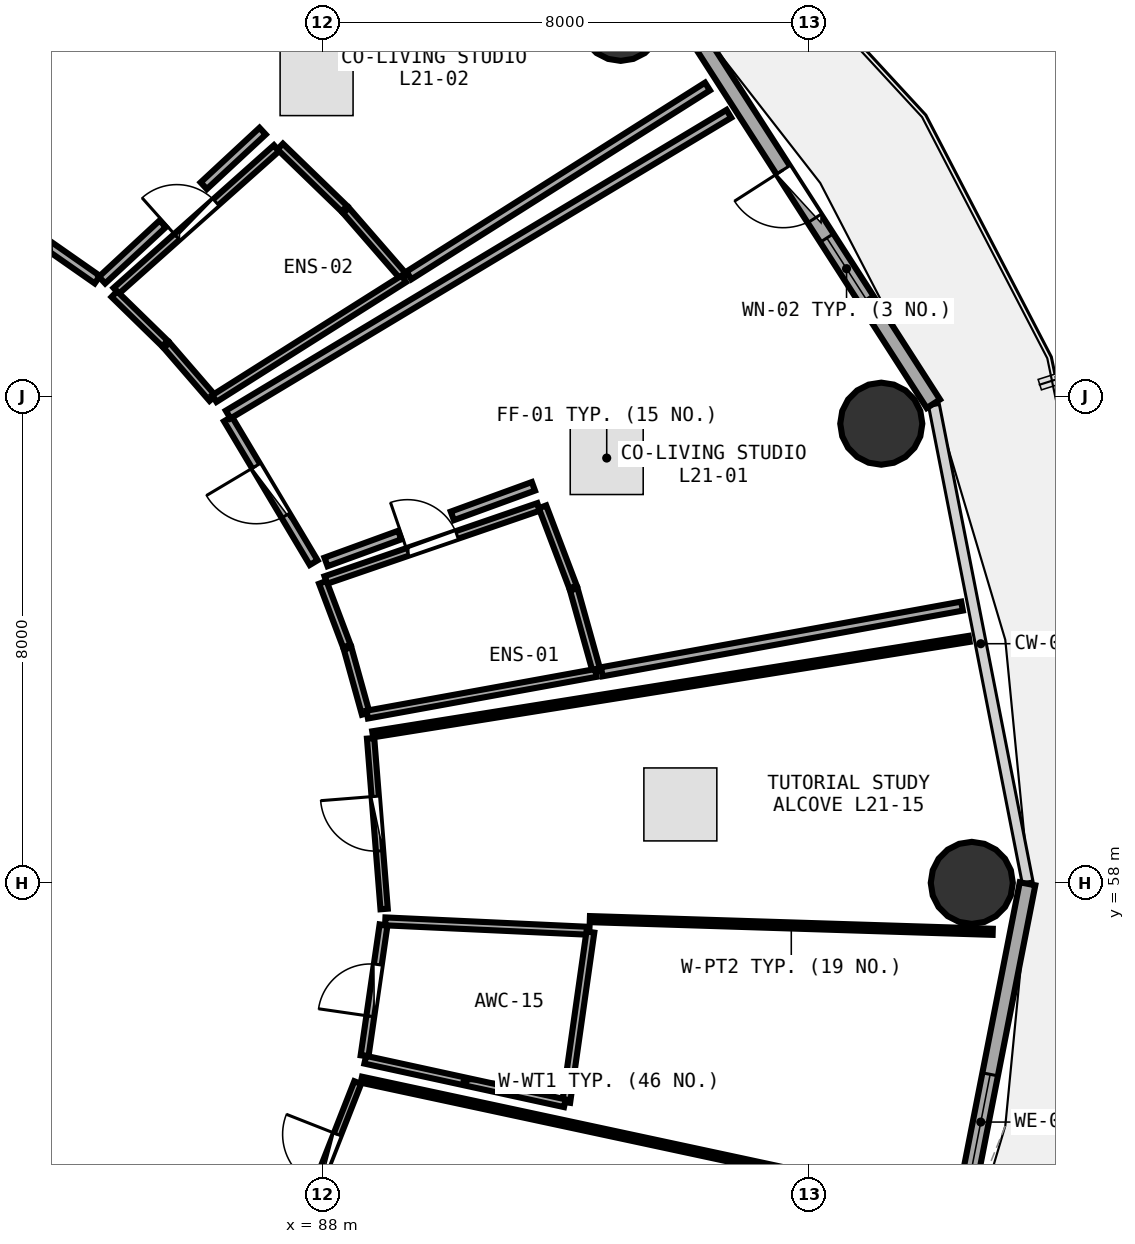
"""IFC4 building model, lengths in metres.
Left out: names, types, materials, properties, quantities, classifications, styles, units other than length and angle.
Written with IfcOpenShell. Run it as: python <this file> out.ifc"""

import sys

from ifc_helpers import new_model, si_unit, direction, frame, frame_2d, origin, origin_2d, place, context, subcontext, project, spatial, rectangle, circle, extrude, element, fill, save


model = new_model("IFC4")
c1 = context("Model", 3, precision=1e-05, world=origin(), true_north=direction((0.0, 1.0)))
c2 = subcontext(c1, "Body", "Model", "MODEL_VIEW")
j1 = project(units=[si_unit("LENGTHUNIT", "METRE"), si_unit("PLANEANGLEUNIT", "RADIAN")], contexts=[c1])
p1 = place(None, origin())
s1 = spatial("IfcSite", under=j1, at=p1, CompositionType="ELEMENT")
p2 = place(p1, origin())
s2 = spatial("IfcBuilding", under=s1, at=p2, CompositionType="ELEMENT")
p3 = place(p2, frame((0.0, 0.0, 83.85)))
s3 = spatial("IfcBuildingStorey", under=s2, at=p3, CompositionType="ELEMENT", Elevation=83.85)
for number, where, z_axis, x_axis in (
    (1, (98.68, 58.0, 0.0), (0.0, 0.0, 1.0), (1.0, 0.0, 0.0)),
    (2, (97.192, 65.552, 0.0), (0.0, 0.0, 1.0), (1.0, 0.0, 0.0)),
    (3, (92.906, 72.193, 0.0), (0.0, 0.0, 1.0), (1.0, 0.0, 0.0)),
):
    element("IfcColumn", number, at=place(p3, frame(where, z_axis=z_axis, x_axis=x_axis)), inside=s3, PredefinedType="COLUMN", context=c2, shape_type="SweptSolid", body=[
        extrude(circle(Radius=0.675, at=origin_2d()), origin(), (0.0, 0.0, 1.0), 3.75),
    ])
p4 = place(p3, frame((98.048, 65.879, 0.0), z_axis=(0.0, 0.0, 1.0), x_axis=(-0.540620528459, 0.841266571432, 0.0)))
e4 = element("IfcWall", 4, at=p4, inside=s3, PredefinedType="SOLIDWALL", context=c2, shape_type="SweptSolid", body=[
    extrude(rectangle(XDim=8.193, YDim=0.26, at=frame_2d((4.096, 0.0))), origin(), (0.0, 0.0, 1.0), 3.475),
])
p5 = place(p4, frame((3.621, 0.0, 0.0)))
e5 = element("IfcOpeningElement", 5, at=p5, cuts=e4, PredefinedType="OPENING", context=c2, shape_type="SweptSolid", body=[
    extrude(rectangle(XDim=0.95, YDim=2.1, at=frame_2d((0.475, 1.05))), frame((0.0, 0.14, 0.0), z_axis=(0.0, -1.0, 0.0), x_axis=(1.0, 0.0, 0.0)), (0.0, 0.0, 1.0), 0.28),
])
p6 = place(p4, frame((2.041, 0.0, 0.85)))
e6 = element("IfcOpeningElement", 6, at=p6, cuts=e4, PredefinedType="OPENING", context=c2, shape_type="SweptSolid", body=[
    extrude(rectangle(XDim=1.2, YDim=1.45, at=frame_2d((0.6, 0.725))), frame((0.0, 0.14, 0.0), z_axis=(0.0, -1.0, 0.0), x_axis=(1.0, 0.0, 0.0)), (0.0, 0.0, 1.0), 0.28),
])
p7 = place(p3, frame((98.059, 50.148, 0.0), z_axis=(0.0, 0.0, 1.0), x_axis=(0.192581843632, 0.981280914674, 0.0)))
e7 = element("IfcWall", 7, at=p7, inside=s3, PredefinedType="SOLIDWALL", context=c2, shape_type="SweptSolid", body=[
    extrude(rectangle(XDim=7.987, YDim=0.26, at=frame_2d((3.993, 0.0))), origin(), (0.0, 0.0, 1.0), 3.475),
])
p8 = place(p7, frame((3.193, 0.0, 0.85)))
e8 = element("IfcOpeningElement", 8, at=p8, cuts=e7, PredefinedType="OPENING", context=c2, shape_type="SweptSolid", body=[
    extrude(rectangle(XDim=1.6, YDim=1.45, at=frame_2d((0.8, 0.725))), frame((0.0, 0.14, 0.0), z_axis=(0.0, -1.0, 0.0), x_axis=(1.0, 0.0, 0.0)), (0.0, 0.0, 1.0), 0.28),
])
p9 = place(p3, frame((88.056, 62.98, 0.0), z_axis=(0.0, 0.0, 1.0), x_axis=(0.94570750663, 0.325018940838, 0.0)))
e9 = element("IfcWall", 9, at=p9, inside=s3, PredefinedType="PLUMBINGWALL", context=c2, shape_type="SweptSolid", body=[
    extrude(rectangle(XDim=3.702, YDim=0.13, at=frame_2d((1.851, 0.0))), origin(), (0.0, 0.0, 1.0), 3.175),
])
p10 = place(p9, frame((1.421, 0.0, 0.0)))
e10 = element("IfcOpeningElement", 10, at=p10, cuts=e9, PredefinedType="OPENING", context=c2, shape_type="SweptSolid", body=[
    extrude(rectangle(XDim=0.86, YDim=2.05, at=frame_2d((0.43, 1.025))), frame((0.0, 0.075, 0.0), z_axis=(0.0, -1.0, 0.0), x_axis=(1.0, 0.0, 0.0)), (0.0, 0.0, 1.0), 0.15),
])
p11 = place(p3, frame((87.856, 63.267, 0.0), z_axis=(0.0, 0.0, 1.0), x_axis=(-0.512288635556, 0.858813340535, 0.0)))
e11 = element("IfcWall", 11, at=p11, inside=s3, PredefinedType="PARTITIONING", context=c2, shape_type="SweptSolid", body=[
    extrude(rectangle(XDim=2.751, YDim=0.15, at=frame_2d((1.375, 0.0))), origin(), (0.0, 0.0, 1.0), 2.925),
])
p12 = place(p11, frame((0.901, 0.0, 0.0)))
e12 = element("IfcOpeningElement", 12, at=p12, cuts=e11, PredefinedType="OPENING", context=c2, shape_type="SweptSolid", body=[
    extrude(rectangle(XDim=0.95, YDim=2.08, at=frame_2d((0.475, 1.04))), frame((0.0, 0.085, 0.0), z_axis=(0.0, -1.0, 0.0), x_axis=(1.0, 0.0, 0.0)), (0.0, 0.0, 1.0), 0.17),
])
p13 = place(p3, frame((84.609, 67.736, 0.0), z_axis=(0.0, 0.0, 1.0), x_axis=(0.746989483068, 0.664835853565, 0.0)))
e13 = element("IfcWall", 13, at=p13, inside=s3, PredefinedType="PLUMBINGWALL", context=c2, shape_type="SweptSolid", body=[
    extrude(rectangle(XDim=3.531, YDim=0.13, at=frame_2d((1.765, 0.0))), origin(), (0.0, 0.0, 1.0), 3.175),
])
p14 = place(p13, frame((1.335, 0.0, 0.0)))
e14 = element("IfcOpeningElement", 14, at=p14, cuts=e13, PredefinedType="OPENING", context=c2, shape_type="SweptSolid", body=[
    extrude(rectangle(XDim=0.86, YDim=2.05, at=frame_2d((0.43, 1.025))), frame((0.0, 0.075, 0.0), z_axis=(0.0, -1.0, 0.0), x_axis=(1.0, 0.0, 0.0)), (0.0, 0.0, 1.0), 0.15),
])
p15 = place(p3, frame((84.298, 67.92, 0.0), z_axis=(0.0, 0.0, 1.0), x_axis=(-0.819775565256, 0.572684924378, 0.0)))
e15 = element("IfcWall", 15, at=p15, inside=s3, PredefinedType="PARTITIONING", context=c2, shape_type="SweptSolid", body=[
    extrude(rectangle(XDim=2.867, YDim=0.15, at=frame_2d((1.434, 0.0))), origin(), (0.0, 0.0, 1.0), 2.925),
])
p16 = place(p15, frame((0.959, 0.0, 0.0)))
e16 = element("IfcOpeningElement", 16, at=p16, cuts=e15, PredefinedType="OPENING", context=c2, shape_type="SweptSolid", body=[
    extrude(rectangle(XDim=0.95, YDim=2.08, at=frame_2d((0.475, 1.04))), frame((0.0, 0.085, 0.0), z_axis=(0.0, -1.0, 0.0), x_axis=(1.0, 0.0, 0.0)), (0.0, 0.0, 1.0), 0.17),
])
p17 = place(p3, frame((87.582, 52.177, 0.0), z_axis=(0.0, 0.0, 1.0), x_axis=(0.365846135531, 0.930675348936, 0.0)))
e17 = element("IfcWall", 17, at=p17, inside=s3, PredefinedType="PARTITIONING", context=c2, shape_type="SweptSolid", body=[
    extrude(rectangle(XDim=2.729, YDim=0.12, at=frame_2d((1.364, 0.0))), origin(), (0.0, 0.0, 1.0), 3.235),
])
p18 = place(p17, frame((0.914, 0.0, 0.0)))
e18 = element("IfcOpeningElement", 18, at=p18, cuts=e17, PredefinedType="OPENING", context=c2, shape_type="SweptSolid", body=[
    extrude(rectangle(XDim=0.9, YDim=2.08, at=frame_2d((0.45, 1.04))), frame((0.0, 0.07, 0.0), z_axis=(0.0, -1.0, 0.0), x_axis=(1.0, 0.0, 0.0)), (0.0, 0.0, 1.0), 0.14),
])
p19 = place(p3, frame((88.694, 55.156, 0.0), z_axis=(0.0, 0.0, 1.0), x_axis=(0.14330641518, 0.989678367637, 0.0)))
e19 = element("IfcWall", 19, at=p19, inside=s3, PredefinedType="PLUMBINGWALL", context=c2, shape_type="SweptSolid", body=[
    extrude(rectangle(XDim=2.176, YDim=0.13, at=frame_2d((1.088, 0.0))), origin(), (0.0, 0.0, 1.0), 3.48),
])
p20 = place(p19, frame((0.658, 0.0, 0.0)))
e20 = element("IfcOpeningElement", 20, at=p20, cuts=e19, PredefinedType="OPENING", context=c2, shape_type="SweptSolid", body=[
    extrude(rectangle(XDim=0.86, YDim=2.05, at=frame_2d((0.43, 1.025))), frame((0.0, 0.075, 0.0), z_axis=(0.0, -1.0, 0.0), x_axis=(1.0, 0.0, 0.0)), (0.0, 0.0, 1.0), 0.15),
])
p21 = place(p3, frame((89.015, 57.571, 0.0), z_axis=(0.0, 0.0, 1.0), x_axis=(-0.079090310477, 0.996867454975, 0.0)))
e21 = element("IfcWall", 21, at=p21, inside=s3, PredefinedType="PARTITIONING", context=c2, shape_type="SweptSolid", body=[
    extrude(rectangle(XDim=2.815, YDim=0.12, at=frame_2d((1.408, 0.0))), origin(), (0.0, 0.0, 1.0), 2.925),
])
p22 = place(p21, frame((0.958, 0.0, 0.0)))
e22 = element("IfcOpeningElement", 22, at=p22, cuts=e21, PredefinedType="OPENING", context=c2, shape_type="SweptSolid", body=[
    extrude(rectangle(XDim=0.9, YDim=2.08, at=frame_2d((0.45, 1.04))), frame((0.0, 0.07, 0.0), z_axis=(0.0, -1.0, 0.0), x_axis=(1.0, 0.0, 0.0)), (0.0, 0.0, 1.0), 0.14),
])
p23 = place(p3, frame((88.713, 60.783, 0.0), z_axis=(0.0, 0.0, 1.0), x_axis=(-0.267768177699, 0.963483369349, 0.0)))
e23 = element("IfcWall", 23, at=p23, inside=s3, PredefinedType="PLUMBINGWALL", context=c2, shape_type="SweptSolid", body=[
    extrude(rectangle(XDim=1.114, YDim=0.13, at=frame_2d((0.557, 0.0))), origin(), (0.0, 0.0, 1.0), 3.48),
])
p24 = place(p3, frame((88.402, 61.895, 0.0), z_axis=(0.0, 0.0, 1.0), x_axis=(-0.353392089541, 0.935475296868, 0.0)))
e24 = element("IfcWall", 24, at=p24, inside=s3, PredefinedType="PLUMBINGWALL", context=c2, shape_type="SweptSolid", body=[
    extrude(rectangle(XDim=1.12, YDim=0.13, at=frame_2d((0.56, 0.0))), origin(), (0.0, 0.0, 1.0), 3.235),
])
p25 = place(p3, frame((91.62, 64.184, 0.0), z_axis=(0.0, 0.0, 1.0), x_axis=(0.355383981736, -0.934720399652, 0.0)))
e25 = element("IfcWall", 25, at=p25, inside=s3, PredefinedType="PLUMBINGWALL", context=c2, shape_type="SweptSolid", body=[
    extrude(rectangle(XDim=1.412, YDim=0.13, at=frame_2d((0.706, 0.0))), origin(), (0.0, 0.0, 1.0), 3.48),
])
p26 = place(p3, frame((92.135, 62.827, 0.0), z_axis=(0.0, 0.0, 1.0), x_axis=(0.268855284743, -0.963180583206, 0.0)))
e26 = element("IfcWall", 26, at=p26, inside=s3, PredefinedType="PLUMBINGWALL", context=c2, shape_type="SweptSolid", body=[
    extrude(rectangle(XDim=1.403, YDim=0.13, at=frame_2d((0.702, 0.0))), origin(), (0.0, 0.0, 1.0), 3.48),
])
p27 = place(p3, frame((92.497, 61.452, 0.0), z_axis=(0.0, 0.0, 1.0), x_axis=(-0.983811592037, -0.17920589101, 0.0)))
e27 = element("IfcWall", 27, at=p27, inside=s3, PredefinedType="PLUMBINGWALL", context=c2, shape_type="SweptSolid", body=[
    extrude(rectangle(XDim=3.821, YDim=0.13, at=frame_2d((1.911, 0.0))), origin(), (0.0, 0.0, 1.0), 3.175),
])
p28 = place(p3, frame((86.45, 65.702, 0.0), z_axis=(0.0, 0.0, 1.0), x_axis=(0.857261851198, 0.514880683731, 0.0)))
e28 = element("IfcWall", 28, at=p28, inside=s3, PredefinedType="PARTITIONING", context=c2, shape_type="SweptSolid", body=[
    extrude(rectangle(XDim=9.606, YDim=0.15, at=frame_2d((4.803, 0.0))), origin(), (0.0, 0.0, 1.0), 2.975),
])
p29 = place(p3, frame((98.52, 62.552, 0.0), z_axis=(0.0, 0.0, 1.0), x_axis=(-0.983768558102, -0.17944197973, 0.0)))
e29 = element("IfcWall", 29, at=p29, inside=s3, PredefinedType="PARTITIONING", context=c2, shape_type="SweptSolid", body=[
    extrude(rectangle(XDim=6.022, YDim=0.15, at=frame_2d((3.011, 0.0))), origin(), (0.0, 0.0, 1.0), 2.975),
])
p30 = place(p3, frame((91.47, 64.521, 0.0), z_axis=(0.0, 0.0, 1.0), x_axis=(-0.939526959999, -0.342474950084, 0.0)))
e30 = element("IfcWall", 30, at=p30, inside=s3, PredefinedType="PARTITIONING", context=c2, shape_type="SweptSolid", body=[
    extrude(rectangle(XDim=1.419, YDim=0.15, at=frame_2d((0.71, 0.0))), origin(), (0.0, 0.0, 1.0), 3.175),
])
p31 = place(p3, frame((89.272, 63.72, 0.0), z_axis=(0.0, 0.0, 1.0), x_axis=(-0.939522570491, -0.342486991779, 0.0)))
e31 = element("IfcWall", 31, at=p31, inside=s3, PredefinedType="PARTITIONING", context=c2, shape_type="SweptSolid", body=[
    extrude(rectangle(XDim=1.291, YDim=0.15, at=frame_2d((0.646, 0.0))), origin(), (0.0, 0.0, 1.0), 3.235),
])
p32 = place(p3, frame((86.193, 65.969, 0.0), z_axis=(0.0, 0.0, 1.0), x_axis=(-0.654583900851, 0.755989362853, 0.0)))
e32 = element("IfcWall", 32, at=p32, inside=s3, PredefinedType="PLUMBINGWALL", context=c2, shape_type="SweptSolid", body=[
    extrude(rectangle(XDim=1.153, YDim=0.13, at=frame_2d((0.577, 0.0))), origin(), (0.0, 0.0, 1.0), 3.48),
])
p33 = place(p3, frame((85.411, 66.87, 0.0), z_axis=(0.0, 0.0, 1.0), x_axis=(-0.715871547002, 0.698232001696, 0.0)))
e33 = element("IfcWall", 33, at=p33, inside=s3, PredefinedType="PLUMBINGWALL", context=c2, shape_type="SweptSolid", body=[
    extrude(rectangle(XDim=1.163, YDim=0.13, at=frame_2d((0.581, 0.0))), origin(), (0.0, 0.0, 1.0), 2.925),
])
p34 = place(p3, frame((87.305, 70.109, 0.0), z_axis=(0.0, 0.0, 1.0), x_axis=(0.718235032224, -0.69580057379, 0.0)))
e34 = element("IfcWall", 34, at=p34, inside=s3, PredefinedType="PLUMBINGWALL", context=c2, shape_type="SweptSolid", body=[
    extrude(rectangle(XDim=1.469, YDim=0.13, at=frame_2d((0.735, 0.0))), origin(), (0.0, 0.0, 1.0), 2.925),
])
p35 = place(p3, frame((88.388, 69.058, 0.0), z_axis=(0.0, 0.0, 1.0), x_axis=(0.656315808405, -0.754486288568, 0.0)))
e35 = element("IfcWall", 35, at=p35, inside=s3, PredefinedType="PLUMBINGWALL", context=c2, shape_type="SweptSolid", body=[
    extrude(rectangle(XDim=1.455, YDim=0.13, at=frame_2d((0.728, 0.0))), origin(), (0.0, 0.0, 1.0), 2.925),
])
p36 = place(p3, frame((89.339, 67.934, 0.0), z_axis=(0.0, 0.0, 1.0), x_axis=(-0.845293712827, -0.53430191751, 0.0)))
e36 = element("IfcWall", 36, at=p36, inside=s3, PredefinedType="PLUMBINGWALL", context=c2, shape_type="SweptSolid", body=[
    extrude(rectangle(XDim=3.687, YDim=0.13, at=frame_2d((1.843, 0.0))), origin(), (0.0, 0.0, 1.0), 3.175),
])
p37 = place(p3, frame((81.921, 69.63, 0.0), z_axis=(0.0, 0.0, 1.0), x_axis=(0.574246298275, 0.818682593511, 0.0)))
e37 = element("IfcWall", 37, at=p37, inside=s3, PredefinedType="PARTITIONING", context=c2, shape_type="SweptSolid", body=[
    extrude(rectangle(XDim=8.525, YDim=0.15, at=frame_2d((4.262, 0.0))), origin(), (0.0, 0.0, 1.0), 2.925),
])
p38 = place(p3, frame((94.333, 71.097, 0.0), z_axis=(0.0, 0.0, 1.0), x_axis=(-0.845032344767, -0.534715191759, 0.0)))
e38 = element("IfcWall", 38, at=p38, inside=s3, PredefinedType="PARTITIONING", context=c2, shape_type="SweptSolid", body=[
    extrude(rectangle(XDim=5.811, YDim=0.15, at=frame_2d((2.905, 0.0))), origin(), (0.0, 0.0, 1.0), 2.975),
])
p39 = place(p3, frame((87.017, 70.363, 0.0), z_axis=(0.0, 0.0, 1.0), x_axis=(-0.733142432265, -0.680075123801, 0.0)))
e39 = element("IfcWall", 39, at=p39, inside=s3, PredefinedType="PARTITIONING", context=c2, shape_type="SweptSolid", body=[
    extrude(rectangle(XDim=1.32, YDim=0.15, at=frame_2d((0.66, 0.0))), origin(), (0.0, 0.0, 1.0), 3.175),
])
p40 = place(p3, frame((85.374, 68.839, 0.0), z_axis=(0.0, 0.0, 1.0), x_axis=(-0.733068131904, -0.680155213159, 0.0)))
e40 = element("IfcWall", 40, at=p40, inside=s3, PredefinedType="PARTITIONING", context=c2, shape_type="SweptSolid", body=[
    extrude(rectangle(XDim=1.361, YDim=0.15, at=frame_2d((0.681, 0.0))), origin(), (0.0, 0.0, 1.0), 3.235),
])
p41 = place(p3, frame((83.53, 72.697, 0.0), z_axis=(0.0, 0.0, 1.0), x_axis=(-0.553523611894, -0.832833483402, 0.0)))
e41 = element("IfcWall", 41, at=p41, inside=s3, PredefinedType="PLUMBINGWALL", context=c2, shape_type="SweptSolid", body=[
    extrude(rectangle(XDim=3.497, YDim=0.13, at=frame_2d((1.749, 0.0))), origin(), (0.0, 0.0, 1.0), 3.175),
])
p42 = place(p3, frame((88.641, 54.764, 0.0), z_axis=(0.0, 0.0, 1.0), x_axis=(0.97772336182, -0.209897660187, 0.0)))
e42 = element("IfcWall", 42, at=p42, inside=s3, PredefinedType="PARTITIONING", context=c2, shape_type="SweptSolid", body=[
    extrude(rectangle(XDim=9.906, YDim=0.1, at=frame_2d((4.953, 0.0))), origin(), (0.0, 0.0, 1.0), 2.975),
])
p43 = place(p3, frame((89.034, 57.367, 0.0), z_axis=(0.0, 0.0, 1.0), x_axis=(0.998931351305, -0.046218560994, 0.0)))
e43 = element("IfcWall", 43, at=p43, inside=s3, PredefinedType="PLUMBINGWALL", context=c2, shape_type="SweptSolid", body=[
    extrude(rectangle(XDim=3.36, YDim=0.13, at=frame_2d((1.68, 0.0))), origin(), (0.0, 0.0, 1.0), 3.175),
])
p44 = place(p3, frame((92.407, 57.191, 0.0), z_axis=(0.0, 0.0, 1.0), x_axis=(-0.140575090878, -0.990070019658, 0.0)))
e44 = element("IfcWall", 44, at=p44, inside=s3, PredefinedType="PLUMBINGWALL", context=c2, shape_type="SweptSolid", body=[
    extrude(rectangle(XDim=2.827, YDim=0.13, at=frame_2d((1.414, 0.0))), origin(), (0.0, 0.0, 1.0), 3.48),
])
p45 = place(p3, frame((91.988, 54.376, 0.0), z_axis=(0.0, 0.0, 1.0), x_axis=(-0.977059488183, 0.212966562048, 0.0)))
e45 = element("IfcWall", 45, at=p45, inside=s3, PredefinedType="PLUMBINGWALL", context=c2, shape_type="SweptSolid", body=[
    extrude(rectangle(XDim=3.36, YDim=0.13, at=frame_2d((1.68, 0.0))), origin(), (0.0, 0.0, 1.0), 3.175),
])
p46 = place(p3, frame((88.827, 60.443, 0.0), z_axis=(0.0, 0.0, 1.0), x_axis=(0.987442472226, 0.157978998742, 0.0)))
e46 = element("IfcWall", 46, at=p46, inside=s3, PredefinedType="PARTITIONING", context=c2, shape_type="SweptSolid", body=[
    extrude(rectangle(XDim=9.934, YDim=0.1, at=frame_2d((4.967, 0.0))), origin(), (0.0, 0.0, 1.0), 2.975),
])
p47 = place(p3, frame((99.024, 57.195, 0.0), z_axis=(0.0, 0.0, 1.0), x_axis=(-0.999502833447, 0.031529128296, 0.0)))
e47 = element("IfcWall", 47, at=p47, inside=s3, PredefinedType="PARTITIONING", context=c2, shape_type="SweptSolid", body=[
    extrude(rectangle(XDim=6.628, YDim=0.1, at=frame_2d((3.314, 0.0))), origin(), (0.0, 0.0, 1.0), 2.975),
])
p48 = place(p5, frame((0.95, 0.0, 0.0), z_axis=(0.0, 0.0, 1.0), x_axis=(-1.0, 0.0, 0.0)))
e48 = element("IfcDoor", 48, at=p48, inside=s3, OperationType="SINGLE_SWING_LEFT", PredefinedType="DOOR", context=c2, shape_type="SweptSolid", body=[
    extrude(rectangle(XDim=0.95, YDim=2.1, at=frame_2d((0.475, 1.05))), frame((0.0, 0.025, 0.0), z_axis=(0.0, -1.0, 0.0), x_axis=(1.0, 0.0, 0.0)), (0.0, 0.0, 1.0), 0.05),
])
fill(e5, e48)
p49 = place(p6, origin())
e49 = element("IfcWindow", 49, at=p49, inside=s3, PartitioningType="SINGLE_PANEL", PredefinedType="WINDOW", context=c2, shape_type="SweptSolid", body=[
    extrude(rectangle(XDim=1.2, YDim=1.45, at=frame_2d((0.6, 0.725))), frame((0.0, 0.03, 0.0), z_axis=(0.0, -1.0, 0.0), x_axis=(1.0, 0.0, 0.0)), (0.0, 0.0, 1.0), 0.06),
])
fill(e6, e49)
p50 = place(p8, origin())
e50 = element("IfcWindow", 50, at=p50, inside=s3, PartitioningType="SINGLE_PANEL", PredefinedType="WINDOW", context=c2, shape_type="SweptSolid", body=[
    extrude(rectangle(XDim=1.6, YDim=1.45, at=frame_2d((0.8, 0.725))), frame((0.0, 0.03, 0.0), z_axis=(0.0, -1.0, 0.0), x_axis=(1.0, 0.0, 0.0)), (0.0, 0.0, 1.0), 0.06),
])
fill(e8, e50)
p51 = place(p10, origin())
e51 = element("IfcDoor", 51, at=p51, inside=s3, OperationType="SINGLE_SWING_LEFT", PredefinedType="DOOR", context=c2, shape_type="SweptSolid", body=[
    extrude(rectangle(XDim=0.86, YDim=2.05, at=frame_2d((0.43, 1.025))), frame((0.0, 0.025, 0.0), z_axis=(0.0, -1.0, 0.0), x_axis=(1.0, 0.0, 0.0)), (0.0, 0.0, 1.0), 0.05),
])
fill(e10, e51)
p52 = place(p12, origin())
e52 = element("IfcDoor", 52, at=p52, inside=s3, OperationType="SINGLE_SWING_RIGHT", PredefinedType="DOOR", context=c2, shape_type="SweptSolid", body=[
    extrude(rectangle(XDim=0.95, YDim=2.08, at=frame_2d((0.475, 1.04))), frame((0.0, 0.025, 0.0), z_axis=(0.0, -1.0, 0.0), x_axis=(1.0, 0.0, 0.0)), (0.0, 0.0, 1.0), 0.05),
])
fill(e12, e52)
p53 = place(p14, origin())
e53 = element("IfcDoor", 53, at=p53, inside=s3, OperationType="SINGLE_SWING_LEFT", PredefinedType="DOOR", context=c2, shape_type="SweptSolid", body=[
    extrude(rectangle(XDim=0.86, YDim=2.05, at=frame_2d((0.43, 1.025))), frame((0.0, 0.025, 0.0), z_axis=(0.0, -1.0, 0.0), x_axis=(1.0, 0.0, 0.0)), (0.0, 0.0, 1.0), 0.05),
])
fill(e14, e53)
p54 = place(p18, origin())
e54 = element("IfcDoor", 54, at=p54, inside=s3, OperationType="SINGLE_SWING_RIGHT", PredefinedType="DOOR", context=c2, shape_type="SweptSolid", body=[
    extrude(rectangle(XDim=0.9, YDim=2.08, at=frame_2d((0.45, 1.04))), frame((0.0, 0.025, 0.0), z_axis=(0.0, -1.0, 0.0), x_axis=(1.0, 0.0, 0.0)), (0.0, 0.0, 1.0), 0.05),
])
fill(e18, e54)
p55 = place(p20, origin())
e55 = element("IfcDoor", 55, at=p55, inside=s3, OperationType="SINGLE_SWING_LEFT", PredefinedType="DOOR", context=c2, shape_type="SweptSolid", body=[
    extrude(rectangle(XDim=0.86, YDim=2.05, at=frame_2d((0.43, 1.025))), frame((0.0, 0.025, 0.0), z_axis=(0.0, -1.0, 0.0), x_axis=(1.0, 0.0, 0.0)), (0.0, 0.0, 1.0), 0.05),
])
fill(e20, e55)
p56 = place(p22, origin())
e56 = element("IfcDoor", 56, at=p56, inside=s3, OperationType="SINGLE_SWING_RIGHT", PredefinedType="DOOR", context=c2, shape_type="SweptSolid", body=[
    extrude(rectangle(XDim=0.9, YDim=2.08, at=frame_2d((0.45, 1.04))), frame((0.0, 0.025, 0.0), z_axis=(0.0, -1.0, 0.0), x_axis=(1.0, 0.0, 0.0)), (0.0, 0.0, 1.0), 0.05),
])
fill(e22, e56)
save(model, sys.argv[1])
